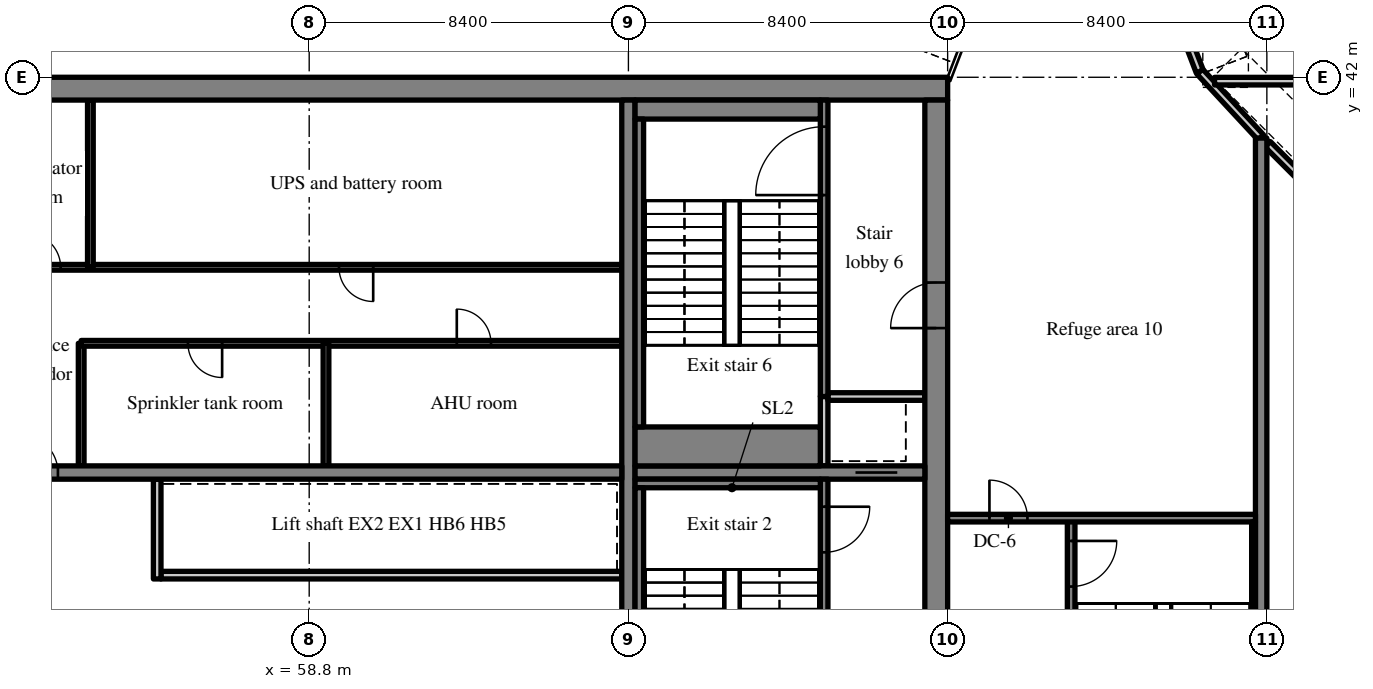
"""IFC4 building model, lengths in metres.
Left out: names, types, materials, properties, quantities, classifications, styles, units other than length and angle.
Written with IfcOpenShell. Run it as: python <this file> out.ifc"""

import sys

from ifc_helpers import new_model, si_unit, direction, frame, frame_2d, origin, place, context, subcontext, project, spatial, rectangle, extrude, source, transform, mapped, element, fill, save


model = new_model("IFC4")
c1 = context("Model", 3, precision=1e-05, world=origin(), true_north=direction((0.0, 1.0)))
c2 = subcontext(c1, "Body", "Model", "MODEL_VIEW")
j1 = project(units=[si_unit("LENGTHUNIT", "METRE"), si_unit("PLANEANGLEUNIT", "RADIAN")], contexts=[c1])
p1 = place(None, origin())
s1 = spatial("IfcSite", under=j1, at=p1, CompositionType="ELEMENT")
p2 = place(p1, origin())
s2 = spatial("IfcBuilding", under=s1, at=p2, CompositionType="ELEMENT")
p3 = place(p2, frame((0.0, 0.0, 206.4)))
s3 = spatial("IfcBuildingStorey", under=s2, at=p3, CompositionType="ELEMENT", Elevation=206.4)
m1 = source(origin(), c2, "Body", "SweptSolid", [
    extrude(rectangle(XDim=50.4, YDim=0.6, at=frame_2d((25.2, 0.0))), origin(), (0.0, 0.0, 1.0), 7.32),
])
p4 = place(p3, frame((25.2, 41.7, 0.0), z_axis=(0.0, 0.0, 1.0), x_axis=(1.0, 0.0, 0.0)))
e1 = element("IfcWall", 1, at=p4, inside=s3, PredefinedType="SHEAR", context=c2, shape_type="MappedRepresentation", body=[
    mapped(m1, transform((0.0, 0.0, 0.0), scale=1.0)),
])
m2 = source(origin(), c2, "Body", "SweptSolid", [
    extrude(rectangle(XDim=18.8, YDim=0.6, at=frame_2d((9.4, 0.0))), origin(), (0.0, 0.0, 1.0), 7.32),
])
p5 = place(p3, frame((75.3, 22.6, 0.0), z_axis=(0.0, 0.0, 1.0), x_axis=(0.0, 1.0, 0.0)))
e2 = element("IfcWall", 2, at=p5, inside=s3, PredefinedType="SHEAR", context=c2, shape_type="MappedRepresentation", body=[
    mapped(m2, transform((0.0, 0.0, 0.0), scale=1.0)),
])
m3 = source(origin(), c2, "Body", "SweptSolid", [
    extrude(rectangle(XDim=1.0, YDim=2.1, at=frame_2d((0.5, 1.05))), frame((0.0, 0.31, 0.0), z_axis=(0.0, -1.0, 0.0), x_axis=(1.0, 0.0, 0.0)), (0.0, 0.0, 1.0), 0.62),
])
p6 = place(p5, frame((2.9, 0.0, 0.0)))
e3 = element("IfcOpeningElement", 3, at=p6, cuts=e2, PredefinedType="OPENING", context=c2, shape_type="MappedRepresentation", body=[
    mapped(m3, transform((0.0, 0.0, 0.0), scale=1.0)),
])
m4 = source(origin(), c2, "Body", "SweptSolid", [
    extrude(rectangle(XDim=1.2, YDim=2.1, at=frame_2d((0.6, 1.05))), frame((0.0, 0.31, 0.0), z_axis=(0.0, -1.0, 0.0), x_axis=(1.0, 0.0, 0.0)), (0.0, 0.0, 1.0), 0.62),
])
p7 = place(p5, frame((12.8, 0.0, 0.0)))
e4 = element("IfcOpeningElement", 4, at=p7, cuts=e2, PredefinedType="OPENING", context=c2, shape_type="MappedRepresentation", body=[
    mapped(m4, transform((0.0, 0.0, 0.0), scale=1.0)),
])
m5 = source(origin(), c2, "Body", "SweptSolid", [
    extrude(rectangle(XDim=18.8, YDim=0.35, at=frame_2d((9.4, 0.0))), origin(), (0.0, 0.0, 1.0), 7.32),
])
p8 = place(p3, frame((67.2, 22.6, 0.0), z_axis=(0.0, 0.0, 1.0), x_axis=(0.0, 1.0, 0.0)))
e5 = element("IfcWall", 5, at=p8, inside=s3, PredefinedType="SHEAR", context=c2, shape_type="MappedRepresentation", body=[
    mapped(m5, transform((0.0, 0.0, 0.0), scale=1.0)),
])
m6 = source(origin(), c2, "Body", "SweptSolid", [
    extrude(rectangle(XDim=16.45, YDim=0.35, at=frame_2d((8.225, 0.0))), origin(), (0.0, 0.0, 1.0), 7.32),
])
p9 = place(p3, frame((50.575, 31.6, 0.0), z_axis=(0.0, 0.0, 1.0), x_axis=(1.0, 0.0, 0.0)))
e6 = element("IfcWall", 6, at=p9, inside=s3, PredefinedType="SHEAR", context=c2, shape_type="MappedRepresentation", body=[
    mapped(m6, transform((0.0, 0.0, 0.0), scale=1.0)),
])
m7 = source(origin(), c2, "Body", "SweptSolid", [
    extrude(rectangle(XDim=1.0, YDim=2.1, at=frame_2d((0.5, 1.05))), frame((0.0, 0.185, 0.0), z_axis=(0.0, -1.0, 0.0), x_axis=(1.0, 0.0, 0.0)), (0.0, 0.0, 1.0), 0.37),
])
p10 = place(p9, frame((0.613, 0.0, 0.0)))
e7 = element("IfcOpeningElement", 7, at=p10, cuts=e6, PredefinedType="OPENING", context=c2, shape_type="MappedRepresentation", body=[
    mapped(m7, transform((0.0, 0.0, 0.0), scale=1.0)),
])
m8 = source(origin(), c2, "Body", "SweptSolid", [
    extrude(rectangle(XDim=7.625, YDim=0.35, at=frame_2d((3.812, 0.0))), origin(), (0.0, 0.0, 1.0), 7.32),
])
p11 = place(p3, frame((67.375, 31.6, 0.0), z_axis=(0.0, 0.0, 1.0), x_axis=(1.0, 0.0, 0.0)))
e8 = element("IfcWall", 8, at=p11, inside=s3, PredefinedType="SHEAR", context=c2, shape_type="MappedRepresentation", body=[
    mapped(m8, transform((0.0, 0.0, 0.0), scale=1.0)),
])
m9 = source(origin(), c2, "Body", "SweptSolid", [
    extrude(rectangle(XDim=1.1, YDim=2.1, at=frame_2d((0.55, 1.05))), frame((0.0, 0.185, 0.0), z_axis=(0.0, -1.0, 0.0), x_axis=(1.0, 0.0, 0.0)), (0.0, 0.0, 1.0), 0.37),
])
p12 = place(p11, frame((5.8, 0.0, 0.0)))
e9 = element("IfcOpeningElement", 9, at=p12, cuts=e8, PredefinedType="OPENING", context=c2, shape_type="MappedRepresentation", body=[
    mapped(m9, transform((0.0, 0.0, 0.0), scale=1.0)),
])
m10 = source(origin(), c2, "Body", "SweptSolid", [
    extrude(rectangle(XDim=18.4, YDim=0.3, at=frame_2d((9.2, 0.0))), origin(), (0.0, 0.0, 1.0), 7.32),
])
p13 = place(p3, frame((83.85, 22.0, 0.0), z_axis=(0.0, 0.0, 1.0), x_axis=(0.0, 1.0, 0.0)))
e10 = element("IfcWall", 10, at=p13, inside=s3, PredefinedType="SHEAR", context=c2, shape_type="MappedRepresentation", body=[
    mapped(m10, transform((0.0, 0.0, 0.0), scale=1.0)),
])
m11 = source(origin(), c2, "Body", "SweptSolid", [
    extrude(rectangle(XDim=1.391, YDim=0.2, at=frame_2d((0.695, 0.0))), origin(), (0.0, 0.0, 1.0), 1.1),
])
p14 = place(p3, frame((81.739, 43.445, 0.0), z_axis=(0.0, 0.0, 1.0), x_axis=(0.357790593379, -0.933801847979, 0.0)))
e11 = element("IfcWall", 11, at=p14, inside=s3, PredefinedType="PARAPET", context=c2, shape_type="MappedRepresentation", body=[
    mapped(m11, transform((0.0, 0.0, 0.0), scale=1.0)),
])
m12 = source(origin(), c2, "Body", "SweptSolid", [
    extrude(rectangle(XDim=2.355, YDim=0.2, at=frame_2d((1.178, 0.0))), origin(), (0.0, 0.0, 1.0), 1.1),
])
p15 = place(p3, frame((82.237, 42.147, 0.0), z_axis=(0.0, 0.0, 1.0), x_axis=(0.68007331117, -0.733144113687, 0.0)))
e12 = element("IfcWall", 12, at=p15, inside=s3, PredefinedType="PARAPET", context=c2, shape_type="MappedRepresentation", body=[
    mapped(m12, transform((0.0, 0.0, 0.0), scale=1.0)),
])
m13 = source(origin(), c2, "Body", "SweptSolid", [
    extrude(rectangle(XDim=2.324, YDim=0.2, at=frame_2d((1.162, 0.0))), origin(), (0.0, 0.0, 1.0), 1.1),
])
p16 = place(p3, frame((84.02, 40.239, 0.0), z_axis=(0.0, 0.0, 1.0), x_axis=(0.707106781187, -0.707106781187, 0.0)))
e13 = element("IfcWall", 13, at=p16, inside=s3, PredefinedType="PARAPET", context=c2, shape_type="MappedRepresentation", body=[
    mapped(m13, transform((0.0, 0.0, 0.0), scale=1.0)),
])
m14 = source(origin(), c2, "Body", "SweptSolid", [
    extrude(rectangle(XDim=5.734, YDim=0.2, at=frame_2d((2.867, 0.0))), origin(), (0.0, 0.0, 1.0), 1.1),
])
p17 = place(p3, frame((82.624, 41.898, -0.05), z_axis=(0.0, 0.0, 1.0), x_axis=(1.0, 0.0, 0.0)))
e14 = element("IfcWall", 14, at=p17, inside=s3, PredefinedType="PARAPET", context=c2, shape_type="MappedRepresentation", body=[
    mapped(m14, transform((0.0, 0.0, 0.0), scale=1.0)),
])
m15 = source(origin(), c2, "Body", "SweptSolid", [
    extrude(rectangle(XDim=12.125, YDim=0.2, at=frame_2d((6.062, 0.0))), origin(), (0.0, 0.0, 1.0), 7.32),
])
p18 = place(p3, frame((67.025, 28.9, 0.0), z_axis=(0.0, 0.0, 1.0), x_axis=(-1.0, 0.0, 0.0)))
e15 = element("IfcWall", 15, at=p18, inside=s3, PredefinedType="SOLIDWALL", context=c2, shape_type="MappedRepresentation", body=[
    mapped(m15, transform((0.0, 0.0, 0.0), scale=1.0)),
])
m16 = source(origin(), c2, "Body", "SweptSolid", [
    extrude(rectangle(XDim=2.625, YDim=0.2, at=frame_2d((1.312, 0.0))), origin(), (0.0, 0.0, 1.0), 7.32),
])
p19 = place(p3, frame((54.8, 28.8, 0.0), z_axis=(0.0, 0.0, 1.0), x_axis=(0.0, 1.0, 0.0)))
e16 = element("IfcWall", 16, at=p19, inside=s3, PredefinedType="SOLIDWALL", context=c2, shape_type="MappedRepresentation", body=[
    mapped(m16, transform((0.0, 0.0, 0.0), scale=1.0)),
])
m17 = source(origin(), c2, "Body", "SweptSolid", [
    extrude(rectangle(XDim=3.225, YDim=0.15, at=frame_2d((1.613, 0.0))), origin(), (0.0, 0.0, 1.0), 7.32),
])
p20 = place(p3, frame((52.8, 31.775, 0.0), z_axis=(0.0, 0.0, 1.0), x_axis=(0.0, 1.0, 0.0)))
e17 = element("IfcWall", 17, at=p20, inside=s3, PredefinedType="PARTITIONING", context=c2, shape_type="MappedRepresentation", body=[
    mapped(m17, transform((0.0, 0.0, 0.0), scale=1.0)),
])
m18 = source(origin(), c2, "Body", "SweptSolid", [
    extrude(rectangle(XDim=14.225, YDim=0.15, at=frame_2d((7.112, 0.0))), origin(), (0.0, 0.0, 1.0), 7.32),
])
p21 = place(p3, frame((67.025, 35.0, 0.0), z_axis=(0.0, 0.0, 1.0), x_axis=(-1.0, 0.0, 0.0)))
e18 = element("IfcWall", 18, at=p21, inside=s3, PredefinedType="PARTITIONING", context=c2, shape_type="MappedRepresentation", body=[
    mapped(m18, transform((0.0, 0.0, 0.0), scale=1.0)),
])
m19 = source(origin(), c2, "Body", "SweptSolid", [
    extrude(rectangle(XDim=0.9, YDim=2.1, at=frame_2d((0.45, 1.05))), frame((0.0, 0.085, 0.0), z_axis=(0.0, -1.0, 0.0), x_axis=(1.0, 0.0, 0.0)), (0.0, 0.0, 1.0), 0.17),
])
p22 = place(p21, frame((3.441, 0.0, 0.0)))
e19 = element("IfcOpeningElement", 19, at=p22, cuts=e18, PredefinedType="OPENING", context=c2, shape_type="MappedRepresentation", body=[
    mapped(m19, transform((0.0, 0.0, 0.0), scale=1.0)),
])
p23 = place(p21, frame((10.516, 0.0, 0.0)))
e20 = element("IfcOpeningElement", 20, at=p23, cuts=e18, PredefinedType="OPENING", context=c2, shape_type="MappedRepresentation", body=[
    mapped(m19, transform((0.0, 0.0, 0.0), scale=1.0)),
])
m20 = source(origin(), c2, "Body", "SweptSolid", [
    extrude(rectangle(XDim=16.45, YDim=0.15, at=frame_2d((8.225, 0.0))), origin(), (0.0, 0.0, 1.0), 7.32),
])
p24 = place(p3, frame((67.025, 37.0, 0.0), z_axis=(0.0, 0.0, 1.0), x_axis=(-1.0, 0.0, 0.0)))
e21 = element("IfcWall", 21, at=p24, inside=s3, PredefinedType="PARTITIONING", context=c2, shape_type="MappedRepresentation", body=[
    mapped(m20, transform((0.0, 0.0, 0.0), scale=1.0)),
])
p25 = place(p24, frame((6.541, 0.0, 0.0)))
e22 = element("IfcOpeningElement", 22, at=p25, cuts=e21, PredefinedType="OPENING", context=c2, shape_type="MappedRepresentation", body=[
    mapped(m19, transform((0.0, 0.0, 0.0), scale=1.0)),
])
p26 = place(p24, frame((14.766, 0.0, 0.0)))
e23 = element("IfcOpeningElement", 23, at=p26, cuts=e21, PredefinedType="OPENING", context=c2, shape_type="MappedRepresentation", body=[
    mapped(m19, transform((0.0, 0.0, 0.0), scale=1.0)),
])
p27 = place(p3, frame((59.242, 31.775, 0.0), z_axis=(0.0, 0.0, 1.0), x_axis=(0.0, 1.0, 0.0)))
e24 = element("IfcWall", 24, at=p27, inside=s3, PredefinedType="PARTITIONING", context=c2, shape_type="MappedRepresentation", body=[
    mapped(m17, transform((0.0, 0.0, 0.0), scale=1.0)),
])
m21 = source(origin(), c2, "Body", "SweptSolid", [
    extrude(rectangle(XDim=4.4, YDim=0.15, at=frame_2d((2.2, 0.0))), origin(), (0.0, 0.0, 1.0), 7.32),
])
p28 = place(p3, frame((53.042, 37.0, 0.0), z_axis=(0.0, 0.0, 1.0), x_axis=(0.0, 1.0, 0.0)))
e25 = element("IfcWall", 25, at=p28, inside=s3, PredefinedType="PARTITIONING", context=c2, shape_type="MappedRepresentation", body=[
    mapped(m21, transform((0.0, 0.0, 0.0), scale=1.0)),
])
m22 = source(origin(), c2, "Body", "SweptSolid", [
    extrude(rectangle(XDim=8.825, YDim=0.2, at=frame_2d((4.413, 0.0))), origin(), (0.0, 0.0, 1.0), 7.32),
])
p29 = place(p3, frame((72.35, 22.6, 0.0), z_axis=(0.0, 0.0, 1.0), x_axis=(0.0, 1.0, 0.0)))
e26 = element("IfcWall", 26, at=p29, inside=s3, PredefinedType="SOLIDWALL", context=c2, shape_type="MappedRepresentation", body=[
    mapped(m22, transform((0.0, 0.0, 0.0), scale=1.0)),
])
m23 = source(origin(), c2, "Body", "SweptSolid", [
    extrude(rectangle(XDim=1.2, YDim=2.1, at=frame_2d((0.6, 1.05))), frame((0.0, 0.11, 0.0), z_axis=(0.0, -1.0, 0.0), x_axis=(1.0, 0.0, 0.0)), (0.0, 0.0, 1.0), 0.22),
])
p30 = place(p29, frame((6.9, 0.0, 0.0)))
e27 = element("IfcOpeningElement", 27, at=p30, cuts=e26, PredefinedType="OPENING", context=c2, shape_type="MappedRepresentation", body=[
    mapped(m23, transform((0.0, 0.0, 0.0), scale=1.0)),
])
m24 = source(origin(), c2, "Body", "SweptSolid", [
    extrude(rectangle(XDim=1.825, YDim=0.2, at=frame_2d((0.913, 0.0))), origin(), (0.0, 0.0, 1.0), 7.32),
])
p31 = place(p3, frame((72.35, 31.775, 0.0), z_axis=(0.0, 0.0, 1.0), x_axis=(0.0, 1.0, 0.0)))
e28 = element("IfcWall", 28, at=p31, inside=s3, PredefinedType="SOLIDWALL", context=c2, shape_type="MappedRepresentation", body=[
    mapped(m24, transform((0.0, 0.0, 0.0), scale=1.0)),
])
m25 = source(origin(), c2, "Body", "SweptSolid", [
    extrude(rectangle(XDim=2.55, YDim=0.2, at=frame_2d((1.275, 0.0))), origin(), (0.0, 0.0, 1.0), 7.32),
])
p32 = place(p3, frame((72.45, 33.6, 0.0), z_axis=(0.0, 0.0, 1.0), x_axis=(1.0, 0.0, 0.0)))
e29 = element("IfcWall", 29, at=p32, inside=s3, PredefinedType="SOLIDWALL", context=c2, shape_type="MappedRepresentation", body=[
    mapped(m25, transform((0.0, 0.0, 0.0), scale=1.0)),
])
m26 = source(origin(), c2, "Body", "SweptSolid", [
    extrude(rectangle(XDim=7.8, YDim=0.2, at=frame_2d((3.9, 0.0))), origin(), (0.0, 0.0, 1.0), 7.32),
])
p33 = place(p3, frame((72.35, 33.6, 0.0), z_axis=(0.0, 0.0, 1.0), x_axis=(0.0, 1.0, 0.0)))
e30 = element("IfcWall", 30, at=p33, inside=s3, PredefinedType="SOLIDWALL", context=c2, shape_type="MappedRepresentation", body=[
    mapped(m26, transform((0.0, 0.0, 0.0), scale=1.0)),
])
m27 = source(origin(), c2, "Body", "SweptSolid", [
    extrude(rectangle(XDim=1.8, YDim=2.1, at=frame_2d((0.9, 1.05))), frame((0.0, 0.11, 0.0), z_axis=(0.0, -1.0, 0.0), x_axis=(1.0, 0.0, 0.0)), (0.0, 0.0, 1.0), 0.22),
])
p34 = place(p33, frame((5.3, 0.0, 0.0)))
e31 = element("IfcOpeningElement", 31, at=p34, cuts=e30, PredefinedType="OPENING", context=c2, shape_type="MappedRepresentation", body=[
    mapped(m27, transform((0.0, 0.0, 0.0), scale=1.0)),
])
m28 = source(origin(), c2, "Body", "SweptSolid", [
    extrude(rectangle(XDim=8.3, YDim=0.2, at=frame_2d((4.15, 0.0))), origin(), (0.0, 0.0, 1.0), 7.32),
])
p35 = place(p3, frame((78.85, 22.1, 0.0), z_axis=(0.0, 0.0, 1.0), x_axis=(0.0, 1.0, 0.0)))
e32 = element("IfcWall", 32, at=p35, inside=s3, PredefinedType="SOLIDWALL", context=c2, shape_type="MappedRepresentation", body=[
    mapped(m28, transform((0.0, 0.0, 0.0), scale=1.0)),
])
p36 = place(p35, frame((6.5, 0.0, 0.0)))
e33 = element("IfcOpeningElement", 33, at=p36, cuts=e32, PredefinedType="OPENING", context=c2, shape_type="MappedRepresentation", body=[
    mapped(m23, transform((0.0, 0.0, 0.0), scale=1.0)),
])
m29 = source(origin(), c2, "Body", "SweptSolid", [
    extrude(rectangle(XDim=8.1, YDim=0.2, at=frame_2d((4.05, 0.0))), origin(), (0.0, 0.0, 1.0), 7.32),
])
p37 = place(p3, frame((83.7, 30.4, 0.0), z_axis=(0.0, 0.0, 1.0), x_axis=(-1.0, 0.0, 0.0)))
e34 = element("IfcWall", 34, at=p37, inside=s3, PredefinedType="SOLIDWALL", context=c2, shape_type="MappedRepresentation", body=[
    mapped(m29, transform((0.0, 0.0, 0.0), scale=1.0)),
])
m30 = source(origin(), c2, "Body", "SweptSolid", [
    extrude(rectangle(XDim=1.0, YDim=2.1, at=frame_2d((0.5, 1.05))), frame((0.0, 0.11, 0.0), z_axis=(0.0, -1.0, 0.0), x_axis=(1.0, 0.0, 0.0)), (0.0, 0.0, 1.0), 0.22),
])
p38 = place(p37, frame((6.0, 0.0, 0.0)))
e35 = element("IfcOpeningElement", 35, at=p38, cuts=e34, PredefinedType="OPENING", context=c2, shape_type="MappedRepresentation", body=[
    mapped(m30, transform((0.0, 0.0, 0.0), scale=1.0)),
])
m31 = source(origin(), c2, "Body", "SweptSolid", [
    extrude(rectangle(XDim=4.875, YDim=0.225, at=frame_2d((2.438, 0.0))), origin(), (0.0, 0.0, 1.0), 7.32),
])
p39 = place(p3, frame((67.375, 31.312, 0.0), z_axis=(0.0, 0.0, 1.0), x_axis=(1.0, 0.0, 0.0)))
e36 = element("IfcWall", 36, at=p39, inside=s3, PredefinedType="SOLIDWALL", context=c2, shape_type="MappedRepresentation", body=[
    mapped(m31, transform((0.0, 0.0, 0.0), scale=1.0)),
])
m32 = source(origin(), c2, "Body", "SweptSolid", [
    extrude(rectangle(XDim=8.1, YDim=0.225, at=frame_2d((4.05, 0.0))), origin(), (0.0, 0.0, 1.0), 7.32),
])
p40 = place(p3, frame((67.487, 23.1, 0.0), z_axis=(0.0, 0.0, 1.0), x_axis=(0.0, 1.0, 0.0)))
e37 = element("IfcWall", 37, at=p40, inside=s3, PredefinedType="SOLIDWALL", context=c2, shape_type="MappedRepresentation", body=[
    mapped(m32, transform((0.0, 0.0, 0.0), scale=1.0)),
])
m33 = source(origin(), c2, "Body", "SweptSolid", [
    extrude(rectangle(XDim=4.875, YDim=0.5, at=frame_2d((2.438, 0.0))), origin(), (0.0, 0.0, 1.0), 7.32),
])
p41 = place(p3, frame((67.375, 41.15, 0.0), z_axis=(0.0, 0.0, 1.0), x_axis=(1.0, 0.0, 0.0)))
e38 = element("IfcWall", 38, at=p41, inside=s3, PredefinedType="SOLIDWALL", context=c2, shape_type="MappedRepresentation", body=[
    mapped(m33, transform((0.0, 0.0, 0.0), scale=1.0)),
])
m34 = source(origin(), c2, "Body", "SweptSolid", [
    extrude(rectangle(XDim=4.875, YDim=1.025, at=frame_2d((2.438, 0.0))), origin(), (0.0, 0.0, 1.0), 7.32),
])
p42 = place(p3, frame((67.375, 32.287, 0.0), z_axis=(0.0, 0.0, 1.0), x_axis=(1.0, 0.0, 0.0)))
e39 = element("IfcWall", 39, at=p42, inside=s3, PredefinedType="SOLIDWALL", context=c2, shape_type="MappedRepresentation", body=[
    mapped(m34, transform((0.0, 0.0, 0.0), scale=1.0)),
])
p43 = place(p3, frame((67.487, 32.8, 0.0), z_axis=(0.0, 0.0, 1.0), x_axis=(0.0, 1.0, 0.0)))
e40 = element("IfcWall", 40, at=p43, inside=s3, PredefinedType="SOLIDWALL", context=c2, shape_type="MappedRepresentation", body=[
    mapped(m32, transform((0.0, 0.0, 0.0), scale=1.0)),
])
m35 = source(origin(), c2, "Body", "SweptSolid", [
    extrude(rectangle(XDim=8.1, YDim=0.1, at=frame_2d((4.05, 0.0))), origin(), (0.0, 0.0, 1.0), 7.32),
])
p44 = place(p3, frame((83.65, 22.2, 0.0), z_axis=(0.0, 0.0, 1.0), x_axis=(0.0, 1.0, 0.0)))
e41 = element("IfcWall", 41, at=p44, inside=s3, PredefinedType="SOLIDWALL", context=c2, shape_type="MappedRepresentation", body=[
    mapped(m35, transform((0.0, 0.0, 0.0), scale=1.0)),
])
m36 = source(origin(), c2, "Body", "SweptSolid", [
    extrude(rectangle(XDim=1.0, YDim=2.1, at=frame_2d((0.5, 1.05))), frame((0.0, 0.025, 0.0), z_axis=(0.0, -1.0, 0.0), x_axis=(1.0, 0.0, 0.0)), (0.0, 0.0, 1.0), 0.05),
])
p45 = place(p10, origin())
e42 = element("IfcDoor", 42, at=p45, inside=s3, OperationType="SINGLE_SWING_LEFT", PredefinedType="DOOR", context=c2, shape_type="MappedRepresentation", body=[
    mapped(m36, transform((0.0, 0.0, 0.0), scale=1.0)),
])
fill(e7, e42)
m37 = source(origin(), c2, "Body", "SweptSolid", [
    extrude(rectangle(XDim=0.9, YDim=2.1, at=frame_2d((0.45, 1.05))), frame((0.0, 0.025, 0.0), z_axis=(0.0, -1.0, 0.0), x_axis=(1.0, 0.0, 0.0)), (0.0, 0.0, 1.0), 0.05),
])
p46 = place(p22, origin())
e43 = element("IfcDoor", 43, at=p46, inside=s3, OperationType="SINGLE_SWING_RIGHT", PredefinedType="DOOR", context=c2, shape_type="MappedRepresentation", body=[
    mapped(m37, transform((0.0, 0.0, 0.0), scale=1.0)),
])
fill(e19, e43)
p47 = place(p23, origin())
e44 = element("IfcDoor", 44, at=p47, inside=s3, OperationType="SINGLE_SWING_LEFT", PredefinedType="DOOR", context=c2, shape_type="MappedRepresentation", body=[
    mapped(m37, transform((0.0, 0.0, 0.0), scale=1.0)),
])
fill(e20, e44)
p48 = place(p25, origin())
e45 = element("IfcDoor", 45, at=p48, inside=s3, OperationType="SINGLE_SWING_LEFT", PredefinedType="DOOR", context=c2, shape_type="MappedRepresentation", body=[
    mapped(m37, transform((0.0, 0.0, 0.0), scale=1.0)),
])
fill(e22, e45)
p49 = place(p26, origin())
e46 = element("IfcDoor", 46, at=p49, inside=s3, OperationType="SINGLE_SWING_RIGHT", PredefinedType="DOOR", context=c2, shape_type="MappedRepresentation", body=[
    mapped(m37, transform((0.0, 0.0, 0.0), scale=1.0)),
])
fill(e23, e46)
m38 = source(origin(), c2, "Body", "SweptSolid", [
    extrude(rectangle(XDim=1.2, YDim=2.1, at=frame_2d((0.6, 1.05))), frame((0.0, 0.025, 0.0), z_axis=(0.0, -1.0, 0.0), x_axis=(1.0, 0.0, 0.0)), (0.0, 0.0, 1.0), 0.05),
])
p50 = place(p30, origin())
e47 = element("IfcDoor", 47, at=p50, inside=s3, OperationType="SINGLE_SWING_RIGHT", PredefinedType="DOOR", context=c2, shape_type="MappedRepresentation", body=[
    mapped(m38, transform((0.0, 0.0, 0.0), scale=1.0)),
])
fill(e27, e47)
m39 = source(origin(), c2, "Body", "SweptSolid", [
    extrude(rectangle(XDim=1.1, YDim=2.1, at=frame_2d((0.55, 1.05))), frame((0.0, 0.025, 0.0), z_axis=(0.0, -1.0, 0.0), x_axis=(1.0, 0.0, 0.0)), (0.0, 0.0, 1.0), 0.05),
])
p51 = place(p12, origin())
e48 = element("IfcDoor", 48, at=p51, inside=s3, OperationType="SLIDING_TO_LEFT", PredefinedType="DOOR", context=c2, shape_type="MappedRepresentation", body=[
    mapped(m39, transform((0.0, 0.0, 0.0), scale=1.0)),
])
fill(e9, e48)
m40 = source(origin(), c2, "Body", "SweptSolid", [
    extrude(rectangle(XDim=1.8, YDim=2.1, at=frame_2d((0.9, 1.05))), frame((0.0, 0.025, 0.0), z_axis=(0.0, -1.0, 0.0), x_axis=(1.0, 0.0, 0.0)), (0.0, 0.0, 1.0), 0.05),
])
p52 = place(p34, origin())
e49 = element("IfcDoor", 49, at=p52, inside=s3, OperationType="SINGLE_SWING_LEFT", PredefinedType="DOOR", context=c2, shape_type="MappedRepresentation", body=[
    mapped(m40, transform((0.0, 0.0, 0.0), scale=1.0)),
])
fill(e31, e49)
p53 = place(p7, origin())
e50 = element("IfcDoor", 50, at=p53, inside=s3, OperationType="SINGLE_SWING_LEFT", PredefinedType="DOOR", context=c2, shape_type="MappedRepresentation", body=[
    mapped(m38, transform((0.0, 0.0, 0.0), scale=1.0)),
])
fill(e4, e50)
p54 = place(p36, origin())
e51 = element("IfcDoor", 51, at=p54, inside=s3, OperationType="SINGLE_SWING_RIGHT", PredefinedType="DOOR", context=c2, shape_type="MappedRepresentation", body=[
    mapped(m38, transform((0.0, 0.0, 0.0), scale=1.0)),
])
fill(e33, e51)
p55 = place(p38, origin())
e52 = element("IfcDoor", 52, at=p55, inside=s3, OperationType="SINGLE_SWING_RIGHT", PredefinedType="DOOR", context=c2, shape_type="MappedRepresentation", body=[
    mapped(m36, transform((0.0, 0.0, 0.0), scale=1.0)),
])
fill(e35, e52)
save(model, sys.argv[1])
